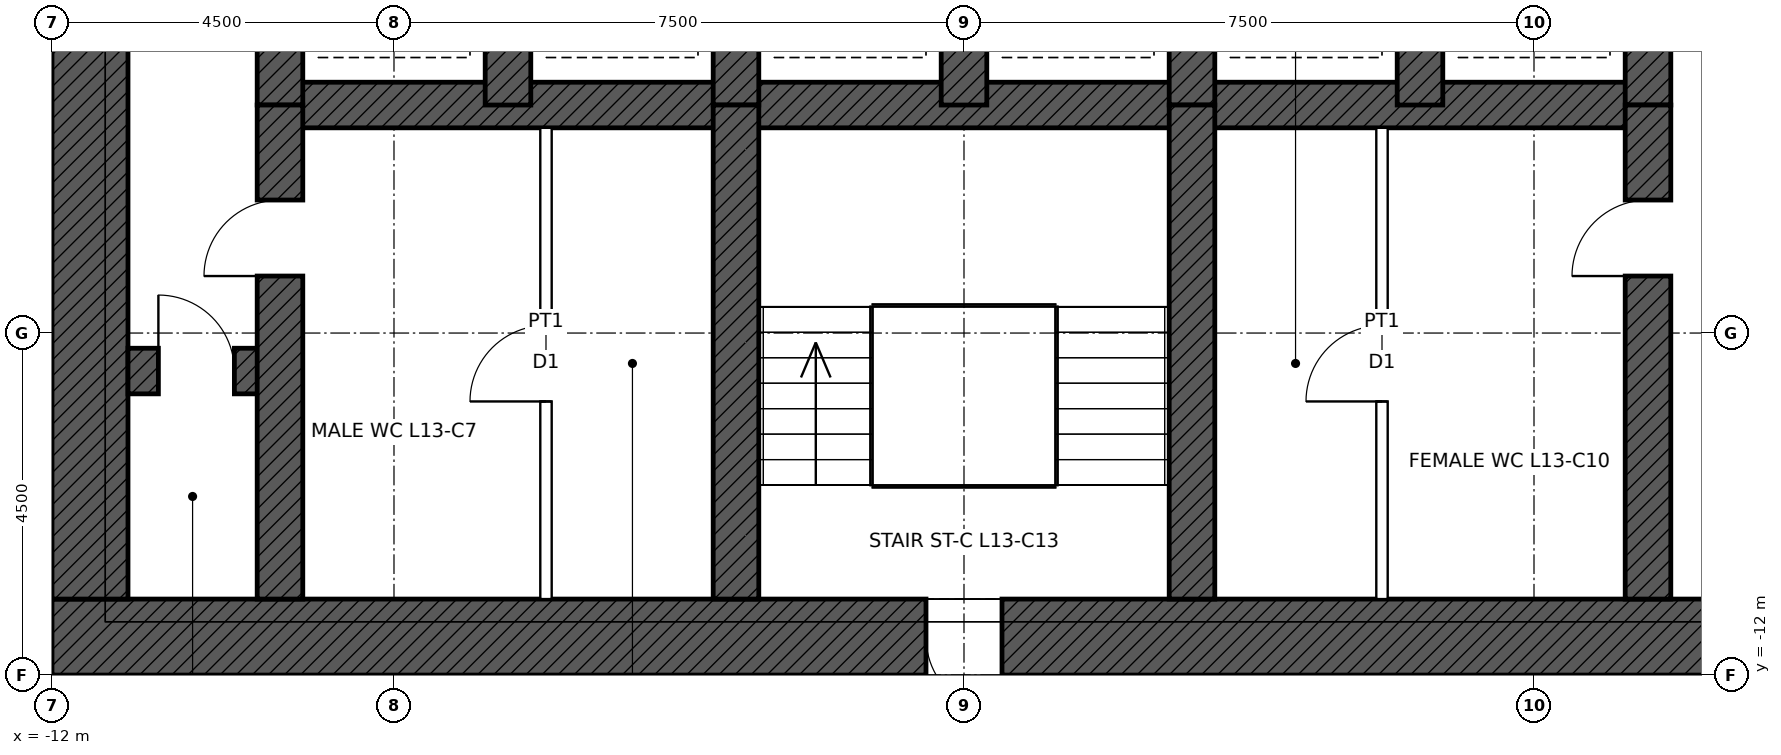
"""IFC4 building model, lengths in metres.
Left out: names, types, materials, properties, quantities, classifications, styles, units other than length and angle.
Written with IfcOpenShell. Run it as: python <this file> out.ifc"""

import sys

from ifc_helpers import new_model, si_unit, direction, frame, frame_2d, origin, place, context, subcontext, project, spatial, rectangle, extrude, element, fill, save


model = new_model("IFC4")
c1 = context("Model", 3, precision=1e-05, world=origin(), true_north=direction((0.0, 1.0)))
c2 = subcontext(c1, "Body", "Model", "MODEL_VIEW")
j1 = project(units=[si_unit("LENGTHUNIT", "METRE"), si_unit("PLANEANGLEUNIT", "RADIAN")], contexts=[c1])
p1 = place(None, origin())
s1 = spatial("IfcSite", under=j1, at=p1, CompositionType="ELEMENT")
p2 = place(p1, origin())
s2 = spatial("IfcBuilding", under=s1, at=p2, CompositionType="ELEMENT")
p3 = place(p2, frame((0.0, 0.0, 68.4)))
s3 = spatial("IfcBuildingStorey", under=s2, at=p3, CompositionType="ELEMENT", Elevation=68.4)
p4 = place(p3, frame((12.0, -11.5, 0.0), z_axis=(0.0, 0.0, 1.0), x_axis=(-1.0, 0.0, 0.0)))
e1 = element("IfcWall", 1, at=p4, inside=s3, PredefinedType="SHEAR", context=c2, shape_type="SweptSolid", body=[
    extrude(rectangle(XDim=24.0, YDim=1.0, at=frame_2d((12.0, 0.0))), origin(), (0.0, 0.0, 1.0), 5.0),
])
p5 = place(p4, frame((11.5, 0.0, 0.0)))
e2 = element("IfcOpeningElement", 2, at=p5, cuts=e1, PredefinedType="OPENING", context=c2, shape_type="SweptSolid", body=[
    extrude(rectangle(XDim=1.0, YDim=2.1, at=frame_2d((0.5, 1.05))), frame((0.0, 0.51, 0.0), z_axis=(0.0, -1.0, 0.0), x_axis=(1.0, 0.0, 0.0)), (0.0, 0.0, 1.0), 1.02),
])
p6 = place(p4, frame((1.0, 0.0, 0.0)))
e3 = element("IfcOpeningElement", 3, at=p6, cuts=e1, PredefinedType="OPENING", context=c2, shape_type="SweptSolid", body=[
    extrude(rectangle(XDim=1.0, YDim=2.4, at=frame_2d((0.5, 1.2))), frame((0.0, 0.51, 0.0), z_axis=(0.0, -1.0, 0.0), x_axis=(1.0, 0.0, 0.0)), (0.0, 0.0, 1.0), 1.02),
])
p7 = place(p3, frame((-11.5, -11.0, 0.0), z_axis=(0.0, 0.0, 1.0), x_axis=(0.0, 1.0, 0.0)))
e4 = element("IfcWall", 4, at=p7, inside=s3, PredefinedType="SHEAR", context=c2, shape_type="SweptSolid", body=[
    extrude(rectangle(XDim=22.0, YDim=1.0, at=frame_2d((11.0, 0.0))), origin(), (0.0, 0.0, 1.0), 5.0),
])
p8 = place(p7, frame((10.5, 0.0, 0.0)))
e5 = element("IfcOpeningElement", 5, at=p8, cuts=e4, PredefinedType="OPENING", context=c2, shape_type="SweptSolid", body=[
    extrude(rectangle(XDim=1.0, YDim=2.4, at=frame_2d((0.5, 1.2))), frame((0.0, 0.51, 0.0), z_axis=(0.0, -1.0, 0.0), x_axis=(1.0, 0.0, 0.0)), (0.0, 0.0, 1.0), 1.02),
])
p9 = place(p3, frame((-9.0, -4.5, 0.0), z_axis=(0.0, 0.0, 1.0), x_axis=(1.0, 0.0, 0.0)))
e6 = element("IfcWall", 6, at=p9, inside=s3, PredefinedType="SHEAR", context=c2, shape_type="SweptSolid", body=[
    extrude(rectangle(XDim=18.0, YDim=0.6, at=frame_2d((9.0, 0.0))), origin(), (0.0, 0.0, 1.0), 5.0),
])
p10 = place(p3, frame((-11.0, -8.0, 0.0), z_axis=(0.0, 0.0, 1.0), x_axis=(1.0, 0.0, 0.0)))
e7 = element("IfcWall", 7, at=p10, inside=s3, PredefinedType="SHEAR", context=c2, shape_type="SweptSolid", body=[
    extrude(rectangle(XDim=2.0, YDim=0.6, at=frame_2d((1.0, 0.0))), origin(), (0.0, 0.0, 1.0), 5.0),
])
p11 = place(p10, frame((0.4, 0.0, 0.0)))
e8 = element("IfcOpeningElement", 8, at=p11, cuts=e7, PredefinedType="OPENING", context=c2, shape_type="SweptSolid", body=[
    extrude(rectangle(XDim=1.0, YDim=2.1, at=frame_2d((0.5, 1.05))), frame((0.0, 0.31, 0.0), z_axis=(0.0, -1.0, 0.0), x_axis=(1.0, 0.0, 0.0)), (0.0, 0.0, 1.0), 0.62),
])
for number, where, z_axis, x_axis in (
    (9, (-9.0, -4.5, 0.0), (0.0, 0.0, 1.0), (0.0, 1.0, 0.0)),
    (10, (9.0, -4.5, 0.0), (0.0, 0.0, 1.0), (0.0, 1.0, 0.0)),
    (11, (-6.0, -4.5, 0.0), (0.0, 0.0, 1.0), (0.0, 1.0, 0.0)),
    (12, (-3.0, -4.5, 0.0), (0.0, 0.0, 1.0), (0.0, 1.0, 0.0)),
    (13, (0.0, -4.5, 0.0), (0.0, 0.0, 1.0), (0.0, 1.0, 0.0)),
    (14, (3.0, -4.5, 0.0), (0.0, 0.0, 1.0), (0.0, 1.0, 0.0)),
    (15, (6.0, -4.5, 0.0), (0.0, 0.0, 1.0), (0.0, 1.0, 0.0)),
):
    element("IfcWall", number, at=place(p3, frame(where, z_axis=z_axis, x_axis=x_axis)), inside=s3, PredefinedType="SHEAR", context=c2, shape_type="SweptSolid", body=[
        extrude(rectangle(XDim=3.0, YDim=0.6, at=frame_2d((1.5, 0.0))), origin(), (0.0, 0.0, 1.0), 5.0),
    ])
p12 = place(p3, frame((-9.0, -11.0, 0.0), z_axis=(0.0, 0.0, 1.0), x_axis=(0.0, 1.0, 0.0)))
e16 = element("IfcWall", 16, at=p12, inside=s3, PredefinedType="SHEAR", context=c2, shape_type="SweptSolid", body=[
    extrude(rectangle(XDim=6.5, YDim=0.6, at=frame_2d((3.25, 0.0))), origin(), (0.0, 0.0, 1.0), 5.0),
])
p13 = place(p12, frame((4.25, 0.0, 0.0)))
e17 = element("IfcOpeningElement", 17, at=p13, cuts=e16, PredefinedType="OPENING", context=c2, shape_type="SweptSolid", body=[
    extrude(rectangle(XDim=1.0, YDim=2.1, at=frame_2d((0.5, 1.05))), frame((0.0, 0.31, 0.0), z_axis=(0.0, -1.0, 0.0), x_axis=(1.0, 0.0, 0.0)), (0.0, 0.0, 1.0), 0.62),
])
p14 = place(p3, frame((9.0, -11.0, 0.0), z_axis=(0.0, 0.0, 1.0), x_axis=(0.0, 1.0, 0.0)))
e18 = element("IfcWall", 18, at=p14, inside=s3, PredefinedType="SHEAR", context=c2, shape_type="SweptSolid", body=[
    extrude(rectangle(XDim=6.5, YDim=0.6, at=frame_2d((3.25, 0.0))), origin(), (0.0, 0.0, 1.0), 5.0),
])
p15 = place(p14, frame((4.25, 0.0, 0.0)))
e19 = element("IfcOpeningElement", 19, at=p15, cuts=e18, PredefinedType="OPENING", context=c2, shape_type="SweptSolid", body=[
    extrude(rectangle(XDim=1.0, YDim=2.1, at=frame_2d((0.5, 1.05))), frame((0.0, 0.31, 0.0), z_axis=(0.0, -1.0, 0.0), x_axis=(1.0, 0.0, 0.0)), (0.0, 0.0, 1.0), 0.62),
])
for number, where, z_axis, x_axis in (
    (20, (-3.0, -11.0, 0.0), (0.0, 0.0, 1.0), (0.0, 1.0, 0.0)),
    (21, (3.0, -11.0, 0.0), (0.0, 0.0, 1.0), (0.0, 1.0, 0.0)),
):
    element("IfcWall", number, at=place(p3, frame(where, z_axis=z_axis, x_axis=x_axis)), inside=s3, PredefinedType="SHEAR", context=c2, shape_type="SweptSolid", body=[
        extrude(rectangle(XDim=6.5, YDim=0.6, at=frame_2d((3.25, 0.0))), origin(), (0.0, 0.0, 1.0), 5.0),
    ])
p16 = place(p3, frame((-5.5, -11.0, 0.0), z_axis=(0.0, 0.0, 1.0), x_axis=(0.0, 1.0, 0.0)))
e22 = element("IfcWall", 22, at=p16, inside=s3, PredefinedType="PARTITIONING", context=c2, shape_type="SweptSolid", body=[
    extrude(rectangle(XDim=6.2, YDim=0.15, at=frame_2d((3.1, 0.0))), origin(), (0.0, 0.0, 1.0), 4.75),
])
p17 = place(p16, frame((2.6, 0.0, 0.0)))
e23 = element("IfcOpeningElement", 23, at=p17, cuts=e22, PredefinedType="OPENING", context=c2, shape_type="SweptSolid", body=[
    extrude(rectangle(XDim=1.0, YDim=2.1, at=frame_2d((0.5, 1.05))), frame((0.0, 0.085, 0.0), z_axis=(0.0, -1.0, 0.0), x_axis=(1.0, 0.0, 0.0)), (0.0, 0.0, 1.0), 0.17),
])
p18 = place(p3, frame((5.5, -11.0, 0.0), z_axis=(0.0, 0.0, 1.0), x_axis=(0.0, 1.0, 0.0)))
e24 = element("IfcWall", 24, at=p18, inside=s3, PredefinedType="PARTITIONING", context=c2, shape_type="SweptSolid", body=[
    extrude(rectangle(XDim=6.2, YDim=0.15, at=frame_2d((3.1, 0.0))), origin(), (0.0, 0.0, 1.0), 4.75),
])
p19 = place(p18, frame((2.6, 0.0, 0.0)))
e25 = element("IfcOpeningElement", 25, at=p19, cuts=e24, PredefinedType="OPENING", context=c2, shape_type="SweptSolid", body=[
    extrude(rectangle(XDim=1.0, YDim=2.1, at=frame_2d((0.5, 1.05))), frame((0.0, 0.085, 0.0), z_axis=(0.0, -1.0, 0.0), x_axis=(1.0, 0.0, 0.0)), (0.0, 0.0, 1.0), 0.17),
])
p20 = place(p5, origin())
e26 = element("IfcDoor", 26, at=p20, inside=s3, OperationType="SINGLE_SWING_LEFT", PredefinedType="DOOR", context=c2, shape_type="SweptSolid", body=[
    extrude(rectangle(XDim=1.0, YDim=2.1, at=frame_2d((0.5, 1.05))), frame((0.0, 0.485, 0.0), z_axis=(0.0, -1.0, 0.0), x_axis=(1.0, 0.0, 0.0)), (0.0, 0.0, 1.0), 0.05),
])
fill(e2, e26)
p21 = place(p13, origin())
e27 = element("IfcDoor", 27, at=p21, inside=s3, OperationType="SINGLE_SWING_LEFT", PredefinedType="DOOR", context=c2, shape_type="SweptSolid", body=[
    extrude(rectangle(XDim=1.0, YDim=2.1, at=frame_2d((0.5, 1.05))), frame((0.0, 0.025, 0.0), z_axis=(0.0, -1.0, 0.0), x_axis=(1.0, 0.0, 0.0)), (0.0, 0.0, 1.0), 0.05),
])
fill(e17, e27)
p22 = place(p15, origin())
e28 = element("IfcDoor", 28, at=p22, inside=s3, OperationType="SINGLE_SWING_LEFT", PredefinedType="DOOR", context=c2, shape_type="SweptSolid", body=[
    extrude(rectangle(XDim=1.0, YDim=2.1, at=frame_2d((0.5, 1.05))), frame((0.0, 0.025, 0.0), z_axis=(0.0, -1.0, 0.0), x_axis=(1.0, 0.0, 0.0)), (0.0, 0.0, 1.0), 0.05),
])
fill(e19, e28)
p23 = place(p11, origin())
e29 = element("IfcDoor", 29, at=p23, inside=s3, OperationType="SINGLE_SWING_LEFT", PredefinedType="DOOR", context=c2, shape_type="SweptSolid", body=[
    extrude(rectangle(XDim=1.0, YDim=2.1, at=frame_2d((0.5, 1.05))), frame((0.0, 0.025, 0.0), z_axis=(0.0, -1.0, 0.0), x_axis=(1.0, 0.0, 0.0)), (0.0, 0.0, 1.0), 0.05),
])
fill(e8, e29)
p24 = place(p17, origin())
e30 = element("IfcDoor", 30, at=p24, inside=s3, OperationType="SINGLE_SWING_LEFT", PredefinedType="DOOR", context=c2, shape_type="SweptSolid", body=[
    extrude(rectangle(XDim=1.0, YDim=2.1, at=frame_2d((0.5, 1.05))), frame((0.0, 0.025, 0.0), z_axis=(0.0, -1.0, 0.0), x_axis=(1.0, 0.0, 0.0)), (0.0, 0.0, 1.0), 0.05),
])
fill(e23, e30)
p25 = place(p19, origin())
e31 = element("IfcDoor", 31, at=p25, inside=s3, OperationType="SINGLE_SWING_LEFT", PredefinedType="DOOR", context=c2, shape_type="SweptSolid", body=[
    extrude(rectangle(XDim=1.0, YDim=2.1, at=frame_2d((0.5, 1.05))), frame((0.0, 0.025, 0.0), z_axis=(0.0, -1.0, 0.0), x_axis=(1.0, 0.0, 0.0)), (0.0, 0.0, 1.0), 0.05),
])
fill(e25, e31)
save(model, sys.argv[1])
